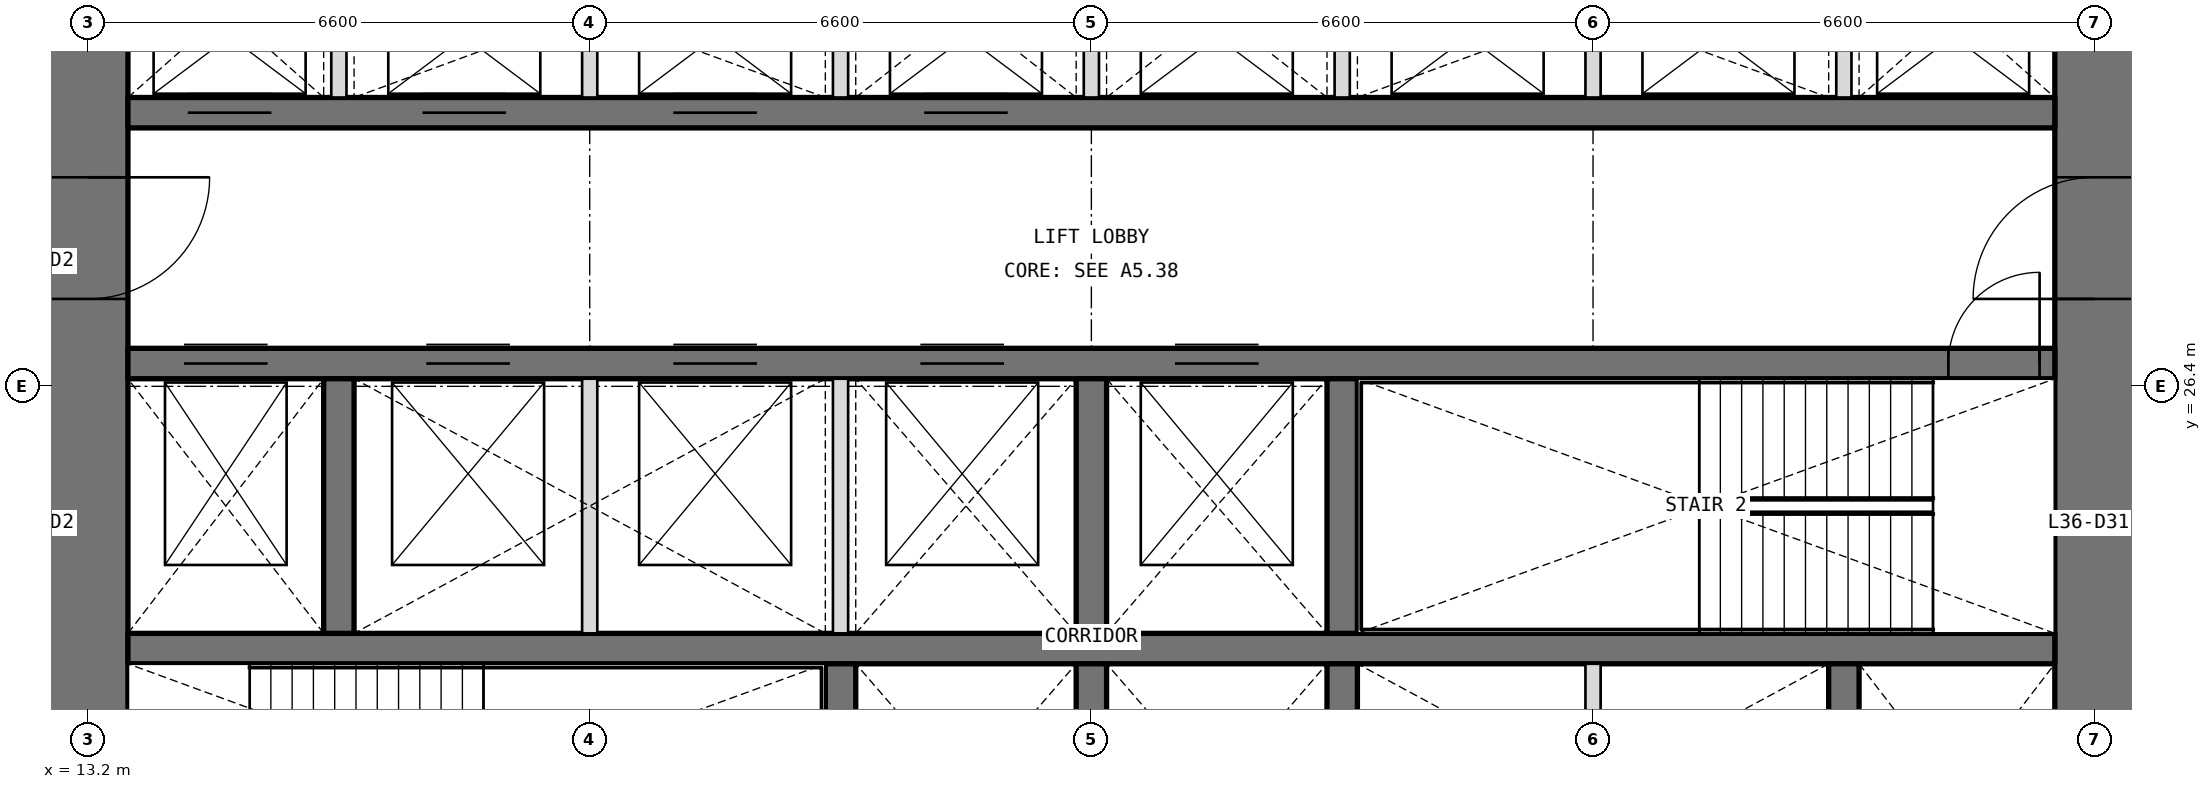
"""IFC4 building model, lengths in metres.
Left out: names, types, materials, properties, quantities, classifications, styles, units other than length and angle.
Written with IfcOpenShell. Run it as: python <this file> out.ifc"""

import sys

from ifc_helpers import new_model, si_unit, direction, frame, frame_2d, origin, place, context, subcontext, project, spatial, rectangle, extrude, element, fill, save


model = new_model("IFC4")
c1 = context("Model", 3, precision=1e-05, world=origin(), true_north=direction((0.0, 1.0)))
c2 = subcontext(c1, "Body", "Model", "MODEL_VIEW")
j1 = project(units=[si_unit("LENGTHUNIT", "METRE"), si_unit("PLANEANGLEUNIT", "RADIAN")], contexts=[c1])
p1 = place(None, origin())
s1 = spatial("IfcSite", under=j1, at=p1, CompositionType="ELEMENT")
p2 = place(p1, origin())
s2 = spatial("IfcBuilding", under=s1, at=p2, CompositionType="ELEMENT")
p3 = place(p2, frame((0.0, 0.0, 159.9)))
s3 = spatial("IfcBuildingStorey", under=s2, at=p3, CompositionType="ELEMENT", Elevation=159.9)
p4 = place(p3, frame((39.6, 13.725, 0.0), z_axis=(0.0, 0.0, 1.0), x_axis=(0.0, 1.0, 0.0)))
e1 = element("IfcWall", 1, at=p4, inside=s3, PredefinedType="SHEAR", context=c2, shape_type="SweptSolid", body=[
    extrude(rectangle(XDim=18.75, YDim=1.05, at=frame_2d((9.375, 0.0))), origin(), (0.0, 0.0, 1.0), 4.2),
])
p5 = place(p4, frame((3.025, 0.0, 0.0)))
e2 = element("IfcOpeningElement", 2, at=p5, cuts=e1, PredefinedType="OPENING", context=c2, shape_type="SweptSolid", body=[
    extrude(rectangle(XDim=1.6, YDim=2.1, at=frame_2d((0.8, 1.05))), frame((0.0, 0.535, 0.0), z_axis=(0.0, -1.0, 0.0), x_axis=(1.0, 0.0, 0.0)), (0.0, 0.0, 1.0), 1.07),
])
p6 = place(p4, frame((13.825, 0.0, 0.0)))
e3 = element("IfcOpeningElement", 3, at=p6, cuts=e1, PredefinedType="OPENING", context=c2, shape_type="SweptSolid", body=[
    extrude(rectangle(XDim=1.6, YDim=2.1, at=frame_2d((0.8, 1.05))), frame((0.0, 0.535, 0.0), z_axis=(0.0, -1.0, 0.0), x_axis=(1.0, 0.0, 0.0)), (0.0, 0.0, 1.0), 1.07),
])
p7 = place(p3, frame((13.2, 32.475, 0.0), z_axis=(0.0, 0.0, 1.0), x_axis=(0.0, -1.0, 0.0)))
e4 = element("IfcWall", 4, at=p7, inside=s3, PredefinedType="SHEAR", context=c2, shape_type="SweptSolid", body=[
    extrude(rectangle(XDim=18.75, YDim=1.05, at=frame_2d((9.375, 0.0))), origin(), (0.0, 0.0, 1.0), 4.2),
])
p8 = place(p7, frame((14.125, 0.0, 0.0)))
e5 = element("IfcOpeningElement", 5, at=p8, cuts=e4, PredefinedType="OPENING", context=c2, shape_type="SweptSolid", body=[
    extrude(rectangle(XDim=1.6, YDim=2.1, at=frame_2d((0.8, 1.05))), frame((0.0, 0.535, 0.0), z_axis=(0.0, -1.0, 0.0), x_axis=(1.0, 0.0, 0.0)), (0.0, 0.0, 1.0), 1.07),
])
p9 = place(p7, frame((3.325, 0.0, 0.0)))
e6 = element("IfcOpeningElement", 6, at=p9, cuts=e4, PredefinedType="OPENING", context=c2, shape_type="SweptSolid", body=[
    extrude(rectangle(XDim=1.6, YDim=2.1, at=frame_2d((0.8, 1.05))), frame((0.0, 0.535, 0.0), z_axis=(0.0, -1.0, 0.0), x_axis=(1.0, 0.0, 0.0)), (0.0, 0.0, 1.0), 1.07),
])
p10 = place(p3, frame((13.725, 22.95, 0.0), z_axis=(0.0, 0.0, 1.0), x_axis=(1.0, 0.0, 0.0)))
e7 = element("IfcWall", 7, at=p10, inside=s3, PredefinedType="SHEAR", context=c2, shape_type="SweptSolid", body=[
    extrude(rectangle(XDim=25.35, YDim=0.4, at=frame_2d((12.675, 0.0))), origin(), (0.0, 0.0, 1.0), 4.2),
])
p11 = place(p3, frame((13.725, 26.7, 0.0), z_axis=(0.0, 0.0, 1.0), x_axis=(1.0, 0.0, 0.0)))
e8 = element("IfcWall", 8, at=p11, inside=s3, PredefinedType="SHEAR", context=c2, shape_type="SweptSolid", body=[
    extrude(rectangle(XDim=25.35, YDim=0.4, at=frame_2d((12.675, 0.0))), origin(), (0.0, 0.0, 1.0), 4.2),
])
p12 = place(p11, frame((23.95, 0.0, 0.0)))
e9 = element("IfcOpeningElement", 9, at=p12, cuts=e8, PredefinedType="OPENING", context=c2, shape_type="SweptSolid", body=[
    extrude(rectangle(XDim=1.2, YDim=2.1, at=frame_2d((0.6, 1.05))), frame((0.0, 0.21, 0.0), z_axis=(0.0, -1.0, 0.0), x_axis=(1.0, 0.0, 0.0)), (0.0, 0.0, 1.0), 0.42),
])
p13 = place(p11, frame((0.738, 0.0, 0.0)))
e10 = element("IfcOpeningElement", 10, at=p13, cuts=e8, PredefinedType="OPENING", context=c2, shape_type="SweptSolid", body=[
    extrude(rectangle(XDim=1.1, YDim=2.1, at=frame_2d((0.55, 1.05))), frame((0.0, 0.21, 0.0), z_axis=(0.0, -1.0, 0.0), x_axis=(1.0, 0.0, 0.0)), (0.0, 0.0, 1.0), 0.42),
])
p14 = place(p11, frame((3.925, 0.0, 0.0)))
e11 = element("IfcOpeningElement", 11, at=p14, cuts=e8, PredefinedType="OPENING", context=c2, shape_type="SweptSolid", body=[
    extrude(rectangle(XDim=1.1, YDim=2.1, at=frame_2d((0.55, 1.05))), frame((0.0, 0.21, 0.0), z_axis=(0.0, -1.0, 0.0), x_axis=(1.0, 0.0, 0.0)), (0.0, 0.0, 1.0), 0.42),
])
p15 = place(p11, frame((7.175, 0.0, 0.0)))
e12 = element("IfcOpeningElement", 12, at=p15, cuts=e8, PredefinedType="OPENING", context=c2, shape_type="SweptSolid", body=[
    extrude(rectangle(XDim=1.1, YDim=2.1, at=frame_2d((0.55, 1.05))), frame((0.0, 0.21, 0.0), z_axis=(0.0, -1.0, 0.0), x_axis=(1.0, 0.0, 0.0)), (0.0, 0.0, 1.0), 0.42),
])
p16 = place(p11, frame((10.425, 0.0, 0.0)))
e13 = element("IfcOpeningElement", 13, at=p16, cuts=e8, PredefinedType="OPENING", context=c2, shape_type="SweptSolid", body=[
    extrude(rectangle(XDim=1.1, YDim=2.1, at=frame_2d((0.55, 1.05))), frame((0.0, 0.21, 0.0), z_axis=(0.0, -1.0, 0.0), x_axis=(1.0, 0.0, 0.0)), (0.0, 0.0, 1.0), 0.42),
])
p17 = place(p11, frame((13.775, 0.0, 0.0)))
e14 = element("IfcOpeningElement", 14, at=p17, cuts=e8, PredefinedType="OPENING", context=c2, shape_type="SweptSolid", body=[
    extrude(rectangle(XDim=1.1, YDim=2.1, at=frame_2d((0.55, 1.05))), frame((0.0, 0.21, 0.0), z_axis=(0.0, -1.0, 0.0), x_axis=(1.0, 0.0, 0.0)), (0.0, 0.0, 1.0), 0.42),
])
p18 = place(p3, frame((13.725, 30.0, 0.0), z_axis=(0.0, 0.0, 1.0), x_axis=(1.0, 0.0, 0.0)))
e15 = element("IfcWall", 15, at=p18, inside=s3, PredefinedType="SHEAR", context=c2, shape_type="SweptSolid", body=[
    extrude(rectangle(XDim=25.35, YDim=0.4, at=frame_2d((12.675, 0.0))), origin(), (0.0, 0.0, 1.0), 4.2),
])
p19 = place(p18, frame((0.788, 0.0, 0.0)))
e16 = element("IfcOpeningElement", 16, at=p19, cuts=e15, PredefinedType="OPENING", context=c2, shape_type="SweptSolid", body=[
    extrude(rectangle(XDim=1.1, YDim=2.1, at=frame_2d((0.55, 1.05))), frame((0.0, 0.21, 0.0), z_axis=(0.0, -1.0, 0.0), x_axis=(1.0, 0.0, 0.0)), (0.0, 0.0, 1.0), 0.42),
])
p20 = place(p18, frame((3.875, 0.0, 0.0)))
e17 = element("IfcOpeningElement", 17, at=p20, cuts=e15, PredefinedType="OPENING", context=c2, shape_type="SweptSolid", body=[
    extrude(rectangle(XDim=1.1, YDim=2.1, at=frame_2d((0.55, 1.05))), frame((0.0, 0.21, 0.0), z_axis=(0.0, -1.0, 0.0), x_axis=(1.0, 0.0, 0.0)), (0.0, 0.0, 1.0), 0.42),
])
p21 = place(p18, frame((7.175, 0.0, 0.0)))
e18 = element("IfcOpeningElement", 18, at=p21, cuts=e15, PredefinedType="OPENING", context=c2, shape_type="SweptSolid", body=[
    extrude(rectangle(XDim=1.1, YDim=2.1, at=frame_2d((0.55, 1.05))), frame((0.0, 0.21, 0.0), z_axis=(0.0, -1.0, 0.0), x_axis=(1.0, 0.0, 0.0)), (0.0, 0.0, 1.0), 0.42),
])
p22 = place(p18, frame((10.475, 0.0, 0.0)))
e19 = element("IfcOpeningElement", 19, at=p22, cuts=e15, PredefinedType="OPENING", context=c2, shape_type="SweptSolid", body=[
    extrude(rectangle(XDim=1.1, YDim=2.1, at=frame_2d((0.55, 1.05))), frame((0.0, 0.21, 0.0), z_axis=(0.0, -1.0, 0.0), x_axis=(1.0, 0.0, 0.0)), (0.0, 0.0, 1.0), 0.42),
])
for number, where, z_axis, x_axis in (
    (20, (23.1, 19.4, 0.0), (0.0, 0.0, 1.0), (0.0, 1.0, 0.0)),
    (21, (26.4, 19.4, 0.0), (0.0, 0.0, 1.0), (0.0, 1.0, 0.0)),
    (22, (29.7, 19.4, 0.0), (0.0, 0.0, 1.0), (0.0, 1.0, 0.0)),
    (23, (36.3, 19.4, 0.0), (0.0, 0.0, 1.0), (0.0, 1.0, 0.0)),
    (24, (16.5, 23.15, 0.0), (0.0, 0.0, 1.0), (0.0, 1.0, 0.0)),
    (25, (26.4, 23.15, 0.0), (0.0, 0.0, 1.0), (0.0, 1.0, 0.0)),
    (26, (29.7, 23.15, 0.0), (0.0, 0.0, 1.0), (0.0, 1.0, 0.0)),
):
    element("IfcWall", number, at=place(p3, frame(where, z_axis=z_axis, x_axis=x_axis)), inside=s3, PredefinedType="SHEAR", context=c2, shape_type="SweptSolid", body=[
        extrude(rectangle(XDim=3.35, YDim=0.4, at=frame_2d((1.675, 0.0))), origin(), (0.0, 0.0, 1.0), 4.2),
    ])
for number, where, z_axis, x_axis in (
    (27, (16.5, 30.2, 0.0), (0.0, 0.0, 1.0), (0.0, 1.0, 0.0)),
    (28, (19.8, 30.2, 0.0), (0.0, 0.0, 1.0), (0.0, 1.0, 0.0)),
    (29, (23.1, 30.2, 0.0), (0.0, 0.0, 1.0), (0.0, 1.0, 0.0)),
    (30, (26.4, 30.2, 0.0), (0.0, 0.0, 1.0), (0.0, 1.0, 0.0)),
    (31, (29.7, 30.2, 0.0), (0.0, 0.0, 1.0), (0.0, 1.0, 0.0)),
    (32, (33.0, 30.2, 0.0), (0.0, 0.0, 1.0), (0.0, 1.0, 0.0)),
    (33, (36.3, 30.2, 0.0), (0.0, 0.0, 1.0), (0.0, 1.0, 0.0)),
):
    element("IfcWall", number, at=place(p3, frame(where, z_axis=z_axis, x_axis=x_axis)), inside=s3, PredefinedType="PARTITIONING", context=c2, shape_type="SweptSolid", body=[
        extrude(rectangle(XDim=2.275, YDim=0.2, at=frame_2d((1.138, 0.0))), origin(), (0.0, 0.0, 1.0), 4.2),
    ])
for number, where, z_axis, x_axis in (
    (34, (33.0, 19.4, 0.0), (0.0, 0.0, 1.0), (0.0, 1.0, 0.0)),
    (35, (19.8, 23.15, 0.0), (0.0, 0.0, 1.0), (0.0, 1.0, 0.0)),
    (36, (23.1, 23.15, 0.0), (0.0, 0.0, 1.0), (0.0, 1.0, 0.0)),
):
    element("IfcWall", number, at=place(p3, frame(where, z_axis=z_axis, x_axis=x_axis)), inside=s3, PredefinedType="PARTITIONING", context=c2, shape_type="SweptSolid", body=[
        extrude(rectangle(XDim=3.35, YDim=0.2, at=frame_2d((1.675, 0.0))), origin(), (0.0, 0.0, 1.0), 4.2),
    ])
p23 = place(p12, origin())
e37 = element("IfcDoor", 37, at=p23, inside=s3, OperationType="SINGLE_SWING_RIGHT", PredefinedType="DOOR", context=c2, shape_type="SweptSolid", body=[
    extrude(rectangle(XDim=1.2, YDim=2.1, at=frame_2d((0.6, 1.05))), frame((0.0, 0.025, 0.0), z_axis=(0.0, -1.0, 0.0), x_axis=(1.0, 0.0, 0.0)), (0.0, 0.0, 1.0), 0.05),
])
fill(e9, e37)
p24 = place(p9, origin())
e38 = element("IfcDoor", 38, at=p24, inside=s3, OperationType="DOUBLE_DOOR_DOUBLE_SWING", PredefinedType="DOOR", context=c2, shape_type="SweptSolid", body=[
    extrude(rectangle(XDim=1.6, YDim=2.1, at=frame_2d((0.8, 1.05))), frame((0.0, 0.025, 0.0), z_axis=(0.0, -1.0, 0.0), x_axis=(1.0, 0.0, 0.0)), (0.0, 0.0, 1.0), 0.05),
])
fill(e6, e38)
p25 = place(p6, origin())
e39 = element("IfcDoor", 39, at=p25, inside=s3, OperationType="DOUBLE_DOOR_DOUBLE_SWING", PredefinedType="DOOR", context=c2, shape_type="SweptSolid", body=[
    extrude(rectangle(XDim=1.6, YDim=2.1, at=frame_2d((0.8, 1.05))), frame((0.0, 0.025, 0.0), z_axis=(0.0, -1.0, 0.0), x_axis=(1.0, 0.0, 0.0)), (0.0, 0.0, 1.0), 0.05),
])
fill(e3, e39)
p26 = place(p19, origin())
e40 = element("IfcDoor", 40, at=p26, inside=s3, OperationType="DOUBLE_DOOR_SLIDING", PredefinedType="DOOR", context=c2, shape_type="SweptSolid", body=[
    extrude(rectangle(XDim=1.1, YDim=2.1, at=frame_2d((0.55, 1.05))), frame((0.0, 0.025, 0.0), z_axis=(0.0, -1.0, 0.0), x_axis=(1.0, 0.0, 0.0)), (0.0, 0.0, 1.0), 0.05),
])
fill(e16, e40)
p27 = place(p20, origin())
e41 = element("IfcDoor", 41, at=p27, inside=s3, OperationType="DOUBLE_DOOR_SLIDING", PredefinedType="DOOR", context=c2, shape_type="SweptSolid", body=[
    extrude(rectangle(XDim=1.1, YDim=2.1, at=frame_2d((0.55, 1.05))), frame((0.0, 0.025, 0.0), z_axis=(0.0, -1.0, 0.0), x_axis=(1.0, 0.0, 0.0)), (0.0, 0.0, 1.0), 0.05),
])
fill(e17, e41)
p28 = place(p21, origin())
e42 = element("IfcDoor", 42, at=p28, inside=s3, OperationType="DOUBLE_DOOR_SLIDING", PredefinedType="DOOR", context=c2, shape_type="SweptSolid", body=[
    extrude(rectangle(XDim=1.1, YDim=2.1, at=frame_2d((0.55, 1.05))), frame((0.0, 0.025, 0.0), z_axis=(0.0, -1.0, 0.0), x_axis=(1.0, 0.0, 0.0)), (0.0, 0.0, 1.0), 0.05),
])
fill(e18, e42)
p29 = place(p22, origin())
e43 = element("IfcDoor", 43, at=p29, inside=s3, OperationType="DOUBLE_DOOR_SLIDING", PredefinedType="DOOR", context=c2, shape_type="SweptSolid", body=[
    extrude(rectangle(XDim=1.1, YDim=2.1, at=frame_2d((0.55, 1.05))), frame((0.0, 0.025, 0.0), z_axis=(0.0, -1.0, 0.0), x_axis=(1.0, 0.0, 0.0)), (0.0, 0.0, 1.0), 0.05),
])
fill(e19, e43)
p30 = place(p13, origin())
e44 = element("IfcDoor", 44, at=p30, inside=s3, OperationType="DOUBLE_DOOR_SLIDING", PredefinedType="DOOR", context=c2, shape_type="SweptSolid", body=[
    extrude(rectangle(XDim=1.1, YDim=2.1, at=frame_2d((0.55, 1.05))), frame((0.0, 0.025, 0.0), z_axis=(0.0, -1.0, 0.0), x_axis=(1.0, 0.0, 0.0)), (0.0, 0.0, 1.0), 0.05),
])
fill(e10, e44)
p31 = place(p14, origin())
e45 = element("IfcDoor", 45, at=p31, inside=s3, OperationType="DOUBLE_DOOR_SLIDING", PredefinedType="DOOR", context=c2, shape_type="SweptSolid", body=[
    extrude(rectangle(XDim=1.1, YDim=2.1, at=frame_2d((0.55, 1.05))), frame((0.0, 0.025, 0.0), z_axis=(0.0, -1.0, 0.0), x_axis=(1.0, 0.0, 0.0)), (0.0, 0.0, 1.0), 0.05),
])
fill(e11, e45)
p32 = place(p15, origin())
e46 = element("IfcDoor", 46, at=p32, inside=s3, OperationType="DOUBLE_DOOR_SLIDING", PredefinedType="DOOR", context=c2, shape_type="SweptSolid", body=[
    extrude(rectangle(XDim=1.1, YDim=2.1, at=frame_2d((0.55, 1.05))), frame((0.0, 0.025, 0.0), z_axis=(0.0, -1.0, 0.0), x_axis=(1.0, 0.0, 0.0)), (0.0, 0.0, 1.0), 0.05),
])
fill(e12, e46)
p33 = place(p16, origin())
e47 = element("IfcDoor", 47, at=p33, inside=s3, OperationType="DOUBLE_DOOR_SLIDING", PredefinedType="DOOR", context=c2, shape_type="SweptSolid", body=[
    extrude(rectangle(XDim=1.1, YDim=2.1, at=frame_2d((0.55, 1.05))), frame((0.0, 0.025, 0.0), z_axis=(0.0, -1.0, 0.0), x_axis=(1.0, 0.0, 0.0)), (0.0, 0.0, 1.0), 0.05),
])
fill(e13, e47)
p34 = place(p17, origin())
e48 = element("IfcDoor", 48, at=p34, inside=s3, OperationType="DOUBLE_DOOR_SLIDING", PredefinedType="DOOR", context=c2, shape_type="SweptSolid", body=[
    extrude(rectangle(XDim=1.1, YDim=2.1, at=frame_2d((0.55, 1.05))), frame((0.0, 0.025, 0.0), z_axis=(0.0, -1.0, 0.0), x_axis=(1.0, 0.0, 0.0)), (0.0, 0.0, 1.0), 0.05),
])
fill(e14, e48)
save(model, sys.argv[1])
